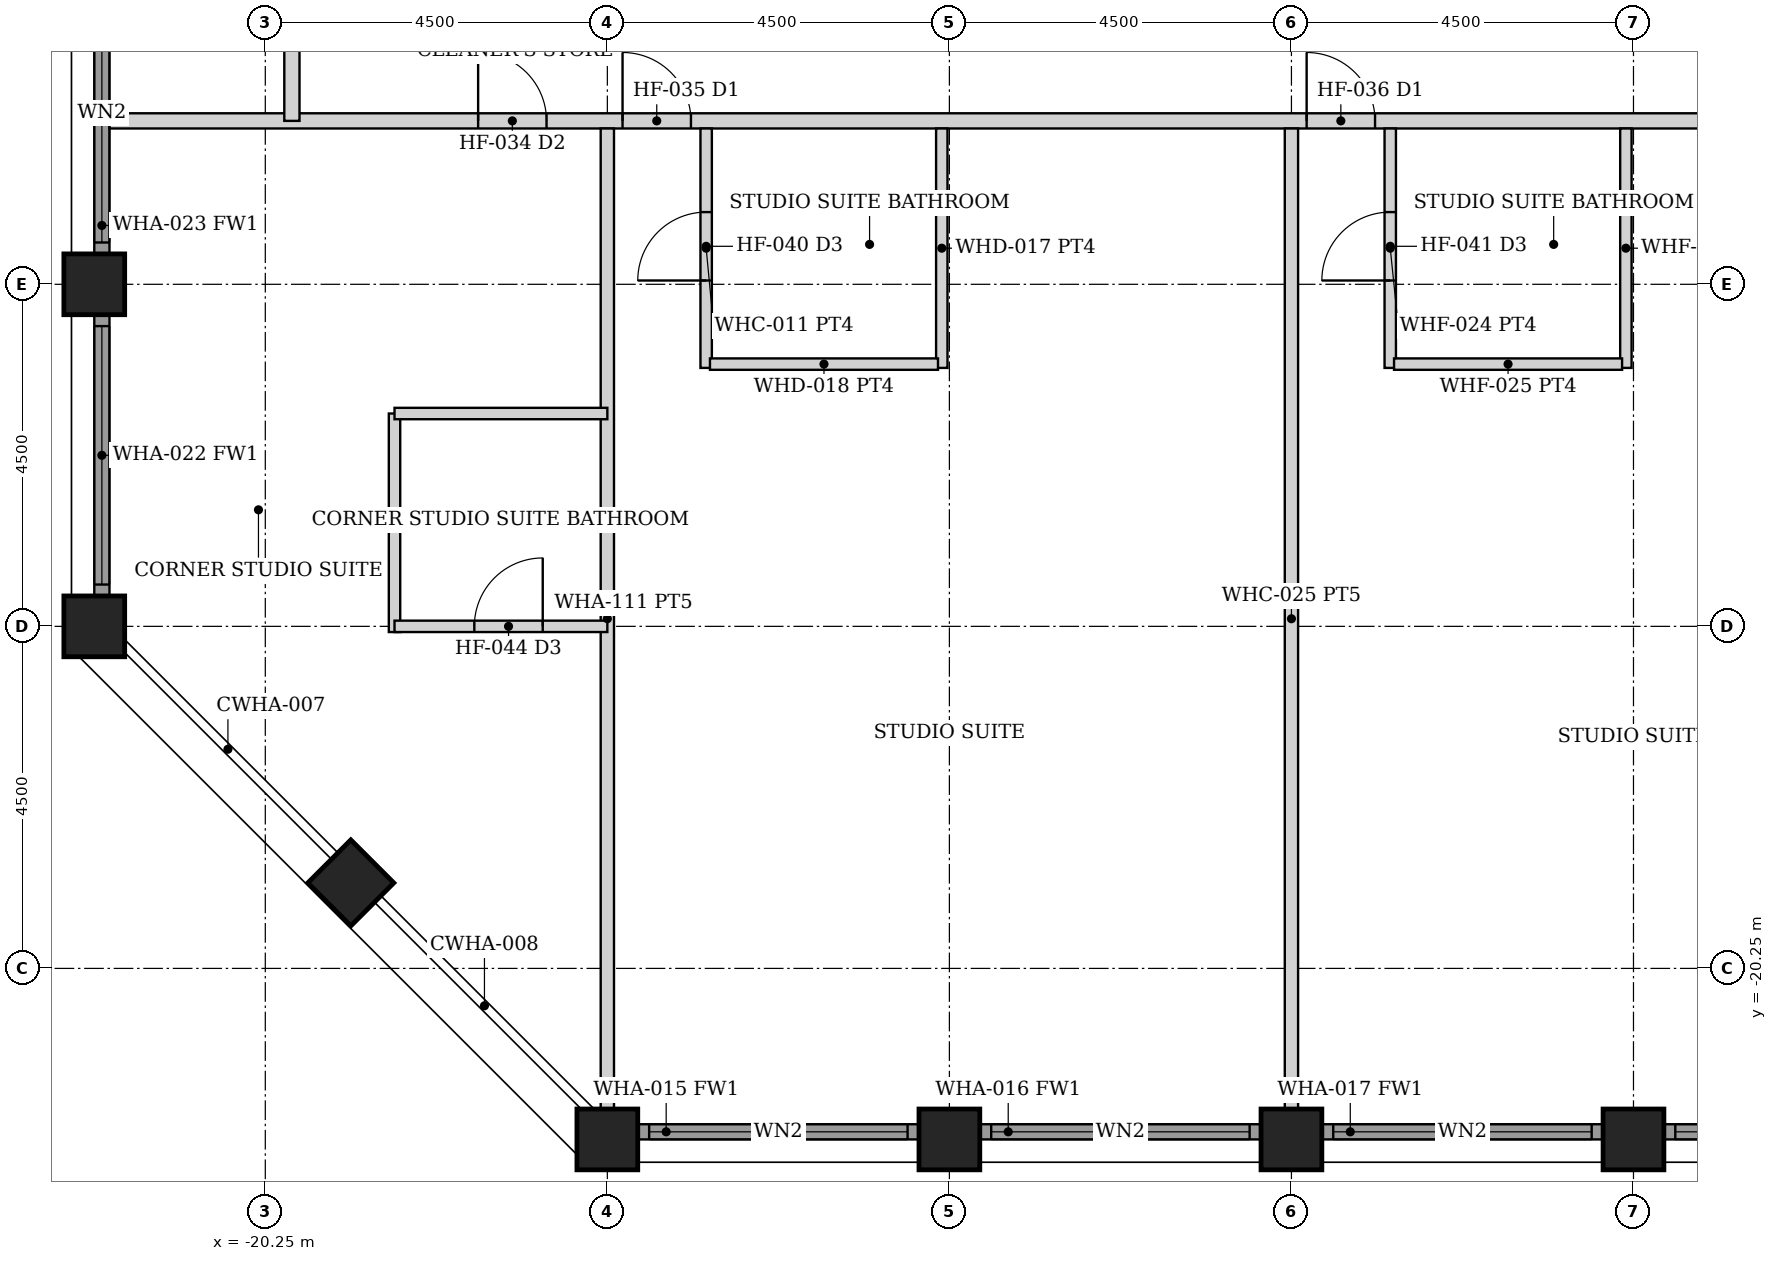
"""IFC4 building model, lengths in metres.
Left out: names, types, materials, properties, quantities, classifications, styles, units other than length and angle.
Written with IfcOpenShell. Run it as: python <this file> out.ifc"""

import sys

from ifc_helpers import new_model, si_unit, direction, frame, frame_2d, origin, origin_2d, place, context, subcontext, project, spatial, rectangle, hollow_rectangle, extrude, element, fill, save


model = new_model("IFC4")
c1 = context("Model", 3, precision=1e-05, world=origin(), true_north=direction((0.0, 1.0)))
c2 = subcontext(c1, "Body", "Model", "MODEL_VIEW")
j1 = project(units=[si_unit("LENGTHUNIT", "METRE"), si_unit("PLANEANGLEUNIT", "RADIAN")], contexts=[c1])
p1 = place(None, origin())
s1 = spatial("IfcSite", under=j1, at=p1, CompositionType="ELEMENT")
p2 = place(p1, origin())
s2 = spatial("IfcBuilding", under=s1, at=p2, CompositionType="ELEMENT")
p3 = place(p2, frame((0.0, 0.0, 172.4)))
s3 = spatial("IfcBuildingStorey", under=s2, at=p3, CompositionType="ELEMENT", Elevation=172.4)
for number, where, z_axis, x_axis in (
    (1, (-15.75, -22.5, 0.0), (0.0, 0.0, 1.0), (0.0, 1.0, 0.0)),
    (2, (-22.5, -15.75, 0.0), (0.0, 0.0, 1.0), (1.0, 0.0, 0.0)),
    (3, (-11.25, -22.5, 0.0), (0.0, 0.0, 1.0), (0.0, 1.0, 0.0)),
    (4, (-22.5, -11.25, 0.0), (0.0, 0.0, 1.0), (1.0, 0.0, 0.0)),
    (5, (-6.75, -22.5, 0.0), (0.0, 0.0, 1.0), (0.0, 1.0, 0.0)),
    (6, (-2.25, -22.5, 0.0), (0.0, 0.0, 1.0), (0.0, 1.0, 0.0)),
    (7, (-19.125, -19.125, 0.0), (0.0, 0.0, 1.0), (0.707, 0.707, 0.0)),
):
    element("IfcColumn", number, at=place(p3, frame(where, z_axis=z_axis, x_axis=x_axis)), inside=s3, PredefinedType="COLUMN", context=c2, shape_type="SweptSolid", body=[
        extrude(hollow_rectangle(XDim=0.8, YDim=0.8, WallThickness=0.045, at=origin_2d()), origin(), (0.0, 0.0, 1.0), 3.6),
    ])
p4 = place(p3, frame((-15.345, -22.4, 0.0), z_axis=(0.0, 0.0, 1.0), x_axis=(1.0, 0.0, 0.0)))
e8 = element("IfcWall", 8, at=p4, inside=s3, PredefinedType="SOLIDWALL", context=c2, shape_type="SweptSolid", body=[
    extrude(rectangle(XDim=3.69, YDim=0.2, at=frame_2d((1.845, 0.0))), origin(), (0.0, 0.0, 1.0), 2.479),
])
p5 = place(p4, frame((0.145, 0.0, 0.3)))
e9 = element("IfcOpeningElement", 9, at=p5, cuts=e8, PredefinedType="OPENING", context=c2, shape_type="SweptSolid", body=[
    extrude(rectangle(XDim=3.4, YDim=2.029, at=frame_2d((1.7, 1.015))), frame((0.0, 0.11, 0.0), z_axis=(0.0, -1.0, 0.0), x_axis=(1.0, 0.0, 0.0)), (0.0, 0.0, 1.0), 0.22),
])
p6 = place(p3, frame((-10.845, -22.4, 0.0), z_axis=(0.0, 0.0, 1.0), x_axis=(1.0, 0.0, 0.0)))
e10 = element("IfcWall", 10, at=p6, inside=s3, PredefinedType="SOLIDWALL", context=c2, shape_type="SweptSolid", body=[
    extrude(rectangle(XDim=3.69, YDim=0.2, at=frame_2d((1.845, 0.0))), origin(), (0.0, 0.0, 1.0), 2.479),
])
p7 = place(p6, frame((0.145, 0.0, 0.3)))
e11 = element("IfcOpeningElement", 11, at=p7, cuts=e10, PredefinedType="OPENING", context=c2, shape_type="SweptSolid", body=[
    extrude(rectangle(XDim=3.4, YDim=2.029, at=frame_2d((1.7, 1.015))), frame((0.0, 0.11, 0.0), z_axis=(0.0, -1.0, 0.0), x_axis=(1.0, 0.0, 0.0)), (0.0, 0.0, 1.0), 0.22),
])
p8 = place(p3, frame((-6.345, -22.4, 0.0), z_axis=(0.0, 0.0, 1.0), x_axis=(1.0, 0.0, 0.0)))
e12 = element("IfcWall", 12, at=p8, inside=s3, PredefinedType="SOLIDWALL", context=c2, shape_type="SweptSolid", body=[
    extrude(rectangle(XDim=3.69, YDim=0.2, at=frame_2d((1.845, 0.0))), origin(), (0.0, 0.0, 1.0), 2.479),
])
p9 = place(p8, frame((0.145, 0.0, 0.3)))
e13 = element("IfcOpeningElement", 13, at=p9, cuts=e12, PredefinedType="OPENING", context=c2, shape_type="SweptSolid", body=[
    extrude(rectangle(XDim=3.4, YDim=2.029, at=frame_2d((1.7, 1.015))), frame((0.0, 0.11, 0.0), z_axis=(0.0, -1.0, 0.0), x_axis=(1.0, 0.0, 0.0)), (0.0, 0.0, 1.0), 0.22),
])
p10 = place(p3, frame((-1.845, -22.4, 0.0), z_axis=(0.0, 0.0, 1.0), x_axis=(1.0, 0.0, 0.0)))
e14 = element("IfcWall", 14, at=p10, inside=s3, PredefinedType="SOLIDWALL", context=c2, shape_type="SweptSolid", body=[
    extrude(rectangle(XDim=3.69, YDim=0.2, at=frame_2d((1.845, 0.0))), origin(), (0.0, 0.0, 1.0), 2.479),
])
p11 = place(p10, frame((0.145, 0.0, 0.3)))
e15 = element("IfcOpeningElement", 15, at=p11, cuts=e14, PredefinedType="OPENING", context=c2, shape_type="SweptSolid", body=[
    extrude(rectangle(XDim=3.4, YDim=2.029, at=frame_2d((1.7, 1.015))), frame((0.0, 0.11, 0.0), z_axis=(0.0, -1.0, 0.0), x_axis=(1.0, 0.0, 0.0)), (0.0, 0.0, 1.0), 0.22),
])
p12 = place(p3, frame((-22.4, -15.345, 0.0), z_axis=(0.0, 0.0, 1.0), x_axis=(0.0, 1.0, 0.0)))
e16 = element("IfcWall", 16, at=p12, inside=s3, PredefinedType="SOLIDWALL", context=c2, shape_type="SweptSolid", body=[
    extrude(rectangle(XDim=3.69, YDim=0.2, at=frame_2d((1.845, 0.0))), origin(), (0.0, 0.0, 1.0), 2.479),
])
p13 = place(p12, frame((0.145, 0.0, 0.3)))
e17 = element("IfcOpeningElement", 17, at=p13, cuts=e16, PredefinedType="OPENING", context=c2, shape_type="SweptSolid", body=[
    extrude(rectangle(XDim=3.4, YDim=2.029, at=frame_2d((1.7, 1.015))), frame((0.0, 0.11, 0.0), z_axis=(0.0, -1.0, 0.0), x_axis=(1.0, 0.0, 0.0)), (0.0, 0.0, 1.0), 0.22),
])
p14 = place(p3, frame((-22.4, -10.845, 0.0), z_axis=(0.0, 0.0, 1.0), x_axis=(0.0, 1.0, 0.0)))
e18 = element("IfcWall", 18, at=p14, inside=s3, PredefinedType="SOLIDWALL", context=c2, shape_type="SweptSolid", body=[
    extrude(rectangle(XDim=3.69, YDim=0.2, at=frame_2d((1.845, 0.0))), origin(), (0.0, 0.0, 1.0), 2.479),
])
p15 = place(p14, frame((0.145, 0.0, 0.3)))
e19 = element("IfcOpeningElement", 19, at=p15, cuts=e18, PredefinedType="OPENING", context=c2, shape_type="SweptSolid", body=[
    extrude(rectangle(XDim=3.4, YDim=2.029, at=frame_2d((1.7, 1.015))), frame((0.0, 0.11, 0.0), z_axis=(0.0, -1.0, 0.0), x_axis=(1.0, 0.0, 0.0)), (0.0, 0.0, 1.0), 0.22),
])
p16 = place(p3, frame((-22.3, -9.1, 0.0), z_axis=(0.0, 0.0, 1.0), x_axis=(1.0, 0.0, 0.0)))
e20 = element("IfcWall", 20, at=p16, inside=s3, PredefinedType="PARTITIONING", context=c2, shape_type="SweptSolid", body=[
    extrude(rectangle(XDim=44.6, YDim=0.2, at=frame_2d((22.3, 0.0))), origin(), (0.0, 0.0, 1.0), 2.473),
])
p17 = place(p16, frame((6.75, 0.0, 0.0)))
e21 = element("IfcOpeningElement", 21, at=p17, cuts=e20, PredefinedType="OPENING", context=c2, shape_type="SweptSolid", body=[
    extrude(rectangle(XDim=0.9, YDim=2.1, at=frame_2d((0.45, 1.05))), frame((0.0, 0.11, 0.0), z_axis=(0.0, -1.0, 0.0), x_axis=(1.0, 0.0, 0.0)), (0.0, 0.0, 1.0), 0.22),
])
p18 = place(p16, frame((15.75, 0.0, 0.0)))
e22 = element("IfcOpeningElement", 22, at=p18, cuts=e20, PredefinedType="OPENING", context=c2, shape_type="SweptSolid", body=[
    extrude(rectangle(XDim=0.9, YDim=2.1, at=frame_2d((0.45, 1.05))), frame((0.0, 0.11, 0.0), z_axis=(0.0, -1.0, 0.0), x_axis=(1.0, 0.0, 0.0)), (0.0, 0.0, 1.0), 0.22),
])
p19 = place(p16, frame((32.45, 0.0, 0.0)))
e23 = element("IfcOpeningElement", 23, at=p19, cuts=e20, PredefinedType="OPENING", context=c2, shape_type="SweptSolid", body=[
    extrude(rectangle(XDim=0.9, YDim=2.1, at=frame_2d((0.45, 1.05))), frame((0.0, 0.11, 0.0), z_axis=(0.0, -1.0, 0.0), x_axis=(1.0, 0.0, 0.0)), (0.0, 0.0, 1.0), 0.22),
])
p20 = place(p16, frame((33.75, 0.0, 0.0)))
e24 = element("IfcOpeningElement", 24, at=p20, cuts=e20, PredefinedType="OPENING", context=c2, shape_type="SweptSolid", body=[
    extrude(rectangle(XDim=0.9, YDim=2.1, at=frame_2d((0.45, 1.05))), frame((0.0, 0.11, 0.0), z_axis=(0.0, -1.0, 0.0), x_axis=(1.0, 0.0, 0.0)), (0.0, 0.0, 1.0), 0.22),
])
p21 = place(p16, frame((38.85, 0.0, 0.0)))
e25 = element("IfcOpeningElement", 25, at=p21, cuts=e20, PredefinedType="OPENING", context=c2, shape_type="SweptSolid", body=[
    extrude(rectangle(XDim=0.9, YDim=2.1, at=frame_2d((0.45, 1.05))), frame((0.0, 0.11, 0.0), z_axis=(0.0, -1.0, 0.0), x_axis=(1.0, 0.0, 0.0)), (0.0, 0.0, 1.0), 0.22),
])
p22 = place(p16, frame((4.85, 0.0, 0.0)))
e26 = element("IfcOpeningElement", 26, at=p22, cuts=e20, PredefinedType="OPENING", context=c2, shape_type="SweptSolid", body=[
    extrude(rectangle(XDim=0.9, YDim=2.1, at=frame_2d((0.45, 1.05))), frame((0.0, 0.11, 0.0), z_axis=(0.0, -1.0, 0.0), x_axis=(1.0, 0.0, 0.0)), (0.0, 0.0, 1.0), 0.22),
])
p23 = place(p3, frame((-19.9, -9.1, 0.0), z_axis=(0.0, 0.0, 1.0), x_axis=(0.0, 1.0, 0.0)))
e27 = element("IfcWall", 27, at=p23, inside=s3, PredefinedType="PARTITIONING", context=c2, shape_type="SweptSolid", body=[
    extrude(rectangle(XDim=6.9, YDim=0.2, at=frame_2d((3.45, 0.0))), origin(), (0.0, 0.0, 1.0), 2.473),
])
p24 = place(p23, frame((3.075, 0.0, 0.0)))
e28 = element("IfcOpeningElement", 28, at=p24, cuts=e27, PredefinedType="OPENING", context=c2, shape_type="SweptSolid", body=[
    extrude(rectangle(XDim=0.8, YDim=2.1, at=frame_2d((0.4, 1.05))), frame((0.0, 0.11, 0.0), z_axis=(0.0, -1.0, 0.0), x_axis=(1.0, 0.0, 0.0)), (0.0, 0.0, 1.0), 0.22),
])
p25 = place(p3, frame((-14.45, -12.35, 0.0), z_axis=(0.0, 0.0, 1.0), x_axis=(0.0, 1.0, 0.0)))
e29 = element("IfcWall", 29, at=p25, inside=s3, PredefinedType="PARTITIONING", context=c2, shape_type="SweptSolid", body=[
    extrude(rectangle(XDim=3.15, YDim=0.15, at=frame_2d((1.575, 0.0))), origin(), (0.0, 0.0, 1.0), 2.473),
])
p26 = place(p25, frame((1.15, 0.0, 0.0)))
e30 = element("IfcOpeningElement", 30, at=p26, cuts=e29, PredefinedType="OPENING", context=c2, shape_type="SweptSolid", body=[
    extrude(rectangle(XDim=0.9, YDim=2.1, at=frame_2d((0.45, 1.05))), frame((0.0, 0.085, 0.0), z_axis=(0.0, -1.0, 0.0), x_axis=(1.0, 0.0, 0.0)), (0.0, 0.0, 1.0), 0.17),
])
p27 = place(p3, frame((-11.35, -12.35, 0.0), z_axis=(0.0, 0.0, 1.0), x_axis=(0.0, 1.0, 0.0)))
e31 = element("IfcWall", 31, at=p27, inside=s3, PredefinedType="PARTITIONING", context=c2, shape_type="SweptSolid", body=[
    extrude(rectangle(XDim=3.15, YDim=0.15, at=frame_2d((1.575, 0.0))), origin(), (0.0, 0.0, 1.0), 2.473),
])
p28 = place(p3, frame((-14.4, -12.3, 0.0), z_axis=(0.0, 0.0, 1.0), x_axis=(1.0, 0.0, 0.0)))
e32 = element("IfcWall", 32, at=p28, inside=s3, PredefinedType="PARTITIONING", context=c2, shape_type="SweptSolid", body=[
    extrude(rectangle(XDim=3.0, YDim=0.15, at=frame_2d((1.5, 0.0))), origin(), (0.0, 0.0, 1.0), 2.473),
])
p29 = place(p3, frame((-5.45, -12.35, 0.0), z_axis=(0.0, 0.0, 1.0), x_axis=(0.0, 1.0, 0.0)))
e33 = element("IfcWall", 33, at=p29, inside=s3, PredefinedType="PARTITIONING", context=c2, shape_type="SweptSolid", body=[
    extrude(rectangle(XDim=3.15, YDim=0.15, at=frame_2d((1.575, 0.0))), origin(), (0.0, 0.0, 1.0), 2.473),
])
p30 = place(p29, frame((1.15, 0.0, 0.0)))
e34 = element("IfcOpeningElement", 34, at=p30, cuts=e33, PredefinedType="OPENING", context=c2, shape_type="SweptSolid", body=[
    extrude(rectangle(XDim=0.9, YDim=2.1, at=frame_2d((0.45, 1.05))), frame((0.0, 0.085, 0.0), z_axis=(0.0, -1.0, 0.0), x_axis=(1.0, 0.0, 0.0)), (0.0, 0.0, 1.0), 0.17),
])
p31 = place(p3, frame((-2.35, -12.35, 0.0), z_axis=(0.0, 0.0, 1.0), x_axis=(0.0, 1.0, 0.0)))
e35 = element("IfcWall", 35, at=p31, inside=s3, PredefinedType="PARTITIONING", context=c2, shape_type="SweptSolid", body=[
    extrude(rectangle(XDim=3.15, YDim=0.15, at=frame_2d((1.575, 0.0))), origin(), (0.0, 0.0, 1.0), 2.473),
])
p32 = place(p3, frame((-5.4, -12.3, 0.0), z_axis=(0.0, 0.0, 1.0), x_axis=(1.0, 0.0, 0.0)))
e36 = element("IfcWall", 36, at=p32, inside=s3, PredefinedType="PARTITIONING", context=c2, shape_type="SweptSolid", body=[
    extrude(rectangle(XDim=3.0, YDim=0.15, at=frame_2d((1.5, 0.0))), origin(), (0.0, 0.0, 1.0), 2.473),
])
for number, where, z_axis, x_axis in (
    (37, (-15.75, -22.1, 0.0), (0.0, 0.0, 1.0), (0.0, 1.0, 0.0)),
    (38, (-6.75, -22.1, 0.0), (0.0, 0.0, 1.0), (0.0, 1.0, 0.0)),
):
    element("IfcWall", number, at=place(p3, frame(where, z_axis=z_axis, x_axis=x_axis)), inside=s3, PredefinedType="PARTITIONING", context=c2, shape_type="SweptSolid", body=[
        extrude(rectangle(XDim=12.9, YDim=0.175, at=frame_2d((6.45, 0.0))), origin(), (0.0, 0.0, 1.0), 2.473),
    ])
p33 = place(p3, frame((-18.55, -15.825, 0.0), z_axis=(0.0, 0.0, 1.0), x_axis=(0.0, 1.0, 0.0)))
e39 = element("IfcWall", 39, at=p33, inside=s3, PredefinedType="PARTITIONING", context=c2, shape_type="SweptSolid", body=[
    extrude(rectangle(XDim=2.875, YDim=0.15, at=frame_2d((1.438, 0.0))), origin(), (0.0, 0.0, 1.0), 2.473),
])
p34 = place(p3, frame((-18.55, -12.95, 0.0), z_axis=(0.0, 0.0, 1.0), x_axis=(1.0, 0.0, 0.0)))
e40 = element("IfcWall", 40, at=p34, inside=s3, PredefinedType="PARTITIONING", context=c2, shape_type="SweptSolid", body=[
    extrude(rectangle(XDim=2.8, YDim=0.15, at=frame_2d((1.4, 0.0))), origin(), (0.0, 0.0, 1.0), 2.473),
])
p35 = place(p3, frame((-18.55, -15.75, 0.0), z_axis=(0.0, 0.0, 1.0), x_axis=(1.0, 0.0, 0.0)))
e41 = element("IfcWall", 41, at=p35, inside=s3, PredefinedType="PARTITIONING", context=c2, shape_type="SweptSolid", body=[
    extrude(rectangle(XDim=2.8, YDim=0.15, at=frame_2d((1.4, 0.0))), origin(), (0.0, 0.0, 1.0), 2.473),
])
p36 = place(p35, frame((1.05, 0.0, 0.0)))
e42 = element("IfcOpeningElement", 42, at=p36, cuts=e41, PredefinedType="OPENING", context=c2, shape_type="SweptSolid", body=[
    extrude(rectangle(XDim=0.9, YDim=2.1, at=frame_2d((0.45, 1.05))), frame((0.0, 0.085, 0.0), z_axis=(0.0, -1.0, 0.0), x_axis=(1.0, 0.0, 0.0)), (0.0, 0.0, 1.0), 0.17),
])
p37 = place(p5, origin())
e43 = element("IfcWindow", 43, at=p37, inside=s3, PartitioningType="SINGLE_PANEL", PredefinedType="WINDOW", context=c2, shape_type="SweptSolid", body=[
    extrude(rectangle(XDim=3.4, YDim=2.029, at=frame_2d((1.7, 1.015))), frame((0.0, 0.03, 0.0), z_axis=(0.0, -1.0, 0.0), x_axis=(1.0, 0.0, 0.0)), (0.0, 0.0, 1.0), 0.06),
])
fill(e9, e43)
p38 = place(p7, origin())
e44 = element("IfcWindow", 44, at=p38, inside=s3, PartitioningType="SINGLE_PANEL", PredefinedType="WINDOW", context=c2, shape_type="SweptSolid", body=[
    extrude(rectangle(XDim=3.4, YDim=2.029, at=frame_2d((1.7, 1.015))), frame((0.0, 0.03, 0.0), z_axis=(0.0, -1.0, 0.0), x_axis=(1.0, 0.0, 0.0)), (0.0, 0.0, 1.0), 0.06),
])
fill(e11, e44)
p39 = place(p9, origin())
e45 = element("IfcWindow", 45, at=p39, inside=s3, PartitioningType="SINGLE_PANEL", PredefinedType="WINDOW", context=c2, shape_type="SweptSolid", body=[
    extrude(rectangle(XDim=3.4, YDim=2.029, at=frame_2d((1.7, 1.015))), frame((0.0, 0.03, 0.0), z_axis=(0.0, -1.0, 0.0), x_axis=(1.0, 0.0, 0.0)), (0.0, 0.0, 1.0), 0.06),
])
fill(e13, e45)
p40 = place(p11, origin())
e46 = element("IfcWindow", 46, at=p40, inside=s3, PartitioningType="SINGLE_PANEL", PredefinedType="WINDOW", context=c2, shape_type="SweptSolid", body=[
    extrude(rectangle(XDim=3.4, YDim=2.029, at=frame_2d((1.7, 1.015))), frame((0.0, 0.03, 0.0), z_axis=(0.0, -1.0, 0.0), x_axis=(1.0, 0.0, 0.0)), (0.0, 0.0, 1.0), 0.06),
])
fill(e15, e46)
p41 = place(p13, origin())
e47 = element("IfcWindow", 47, at=p41, inside=s3, PartitioningType="SINGLE_PANEL", PredefinedType="WINDOW", context=c2, shape_type="SweptSolid", body=[
    extrude(rectangle(XDim=3.4, YDim=2.029, at=frame_2d((1.7, 1.015))), frame((0.0, 0.03, 0.0), z_axis=(0.0, -1.0, 0.0), x_axis=(1.0, 0.0, 0.0)), (0.0, 0.0, 1.0), 0.06),
])
fill(e17, e47)
p42 = place(p15, origin())
e48 = element("IfcWindow", 48, at=p42, inside=s3, PartitioningType="SINGLE_PANEL", PredefinedType="WINDOW", context=c2, shape_type="SweptSolid", body=[
    extrude(rectangle(XDim=3.4, YDim=2.029, at=frame_2d((1.7, 1.015))), frame((0.0, 0.03, 0.0), z_axis=(0.0, -1.0, 0.0), x_axis=(1.0, 0.0, 0.0)), (0.0, 0.0, 1.0), 0.06),
])
fill(e19, e48)
p43 = place(p17, origin())
e49 = element("IfcDoor", 49, at=p43, inside=s3, OperationType="SINGLE_SWING_LEFT", PredefinedType="DOOR", context=c2, shape_type="SweptSolid", body=[
    extrude(rectangle(XDim=0.9, YDim=2.1, at=frame_2d((0.45, 1.05))), frame((0.0, 0.025, 0.0), z_axis=(0.0, -1.0, 0.0), x_axis=(1.0, 0.0, 0.0)), (0.0, 0.0, 1.0), 0.05),
])
fill(e21, e49)
p44 = place(p26, origin())
e50 = element("IfcDoor", 50, at=p44, inside=s3, OperationType="SINGLE_SWING_LEFT", PredefinedType="DOOR", context=c2, shape_type="SweptSolid", body=[
    extrude(rectangle(XDim=0.9, YDim=2.1, at=frame_2d((0.45, 1.05))), frame((0.0, 0.025, 0.0), z_axis=(0.0, -1.0, 0.0), x_axis=(1.0, 0.0, 0.0)), (0.0, 0.0, 1.0), 0.05),
])
fill(e30, e50)
p45 = place(p18, origin())
e51 = element("IfcDoor", 51, at=p45, inside=s3, OperationType="SINGLE_SWING_LEFT", PredefinedType="DOOR", context=c2, shape_type="SweptSolid", body=[
    extrude(rectangle(XDim=0.9, YDim=2.1, at=frame_2d((0.45, 1.05))), frame((0.0, 0.025, 0.0), z_axis=(0.0, -1.0, 0.0), x_axis=(1.0, 0.0, 0.0)), (0.0, 0.0, 1.0), 0.05),
])
fill(e22, e51)
p46 = place(p30, origin())
e52 = element("IfcDoor", 52, at=p46, inside=s3, OperationType="SINGLE_SWING_LEFT", PredefinedType="DOOR", context=c2, shape_type="SweptSolid", body=[
    extrude(rectangle(XDim=0.9, YDim=2.1, at=frame_2d((0.45, 1.05))), frame((0.0, 0.025, 0.0), z_axis=(0.0, -1.0, 0.0), x_axis=(1.0, 0.0, 0.0)), (0.0, 0.0, 1.0), 0.05),
])
fill(e34, e52)
p47 = place(p22, origin())
e53 = element("IfcDoor", 53, at=p47, inside=s3, OperationType="SINGLE_SWING_LEFT", PredefinedType="DOOR", context=c2, shape_type="SweptSolid", body=[
    extrude(rectangle(XDim=0.9, YDim=2.1, at=frame_2d((0.45, 1.05))), frame((0.0, 0.025, 0.0), z_axis=(0.0, -1.0, 0.0), x_axis=(1.0, 0.0, 0.0)), (0.0, 0.0, 1.0), 0.05),
])
fill(e26, e53)
p48 = place(p36, origin())
e54 = element("IfcDoor", 54, at=p48, inside=s3, OperationType="SINGLE_SWING_RIGHT", PredefinedType="DOOR", context=c2, shape_type="SweptSolid", body=[
    extrude(rectangle(XDim=0.9, YDim=2.1, at=frame_2d((0.45, 1.05))), frame((0.0, 0.025, 0.0), z_axis=(0.0, -1.0, 0.0), x_axis=(1.0, 0.0, 0.0)), (0.0, 0.0, 1.0), 0.05),
])
fill(e42, e54)
save(model, sys.argv[1])
